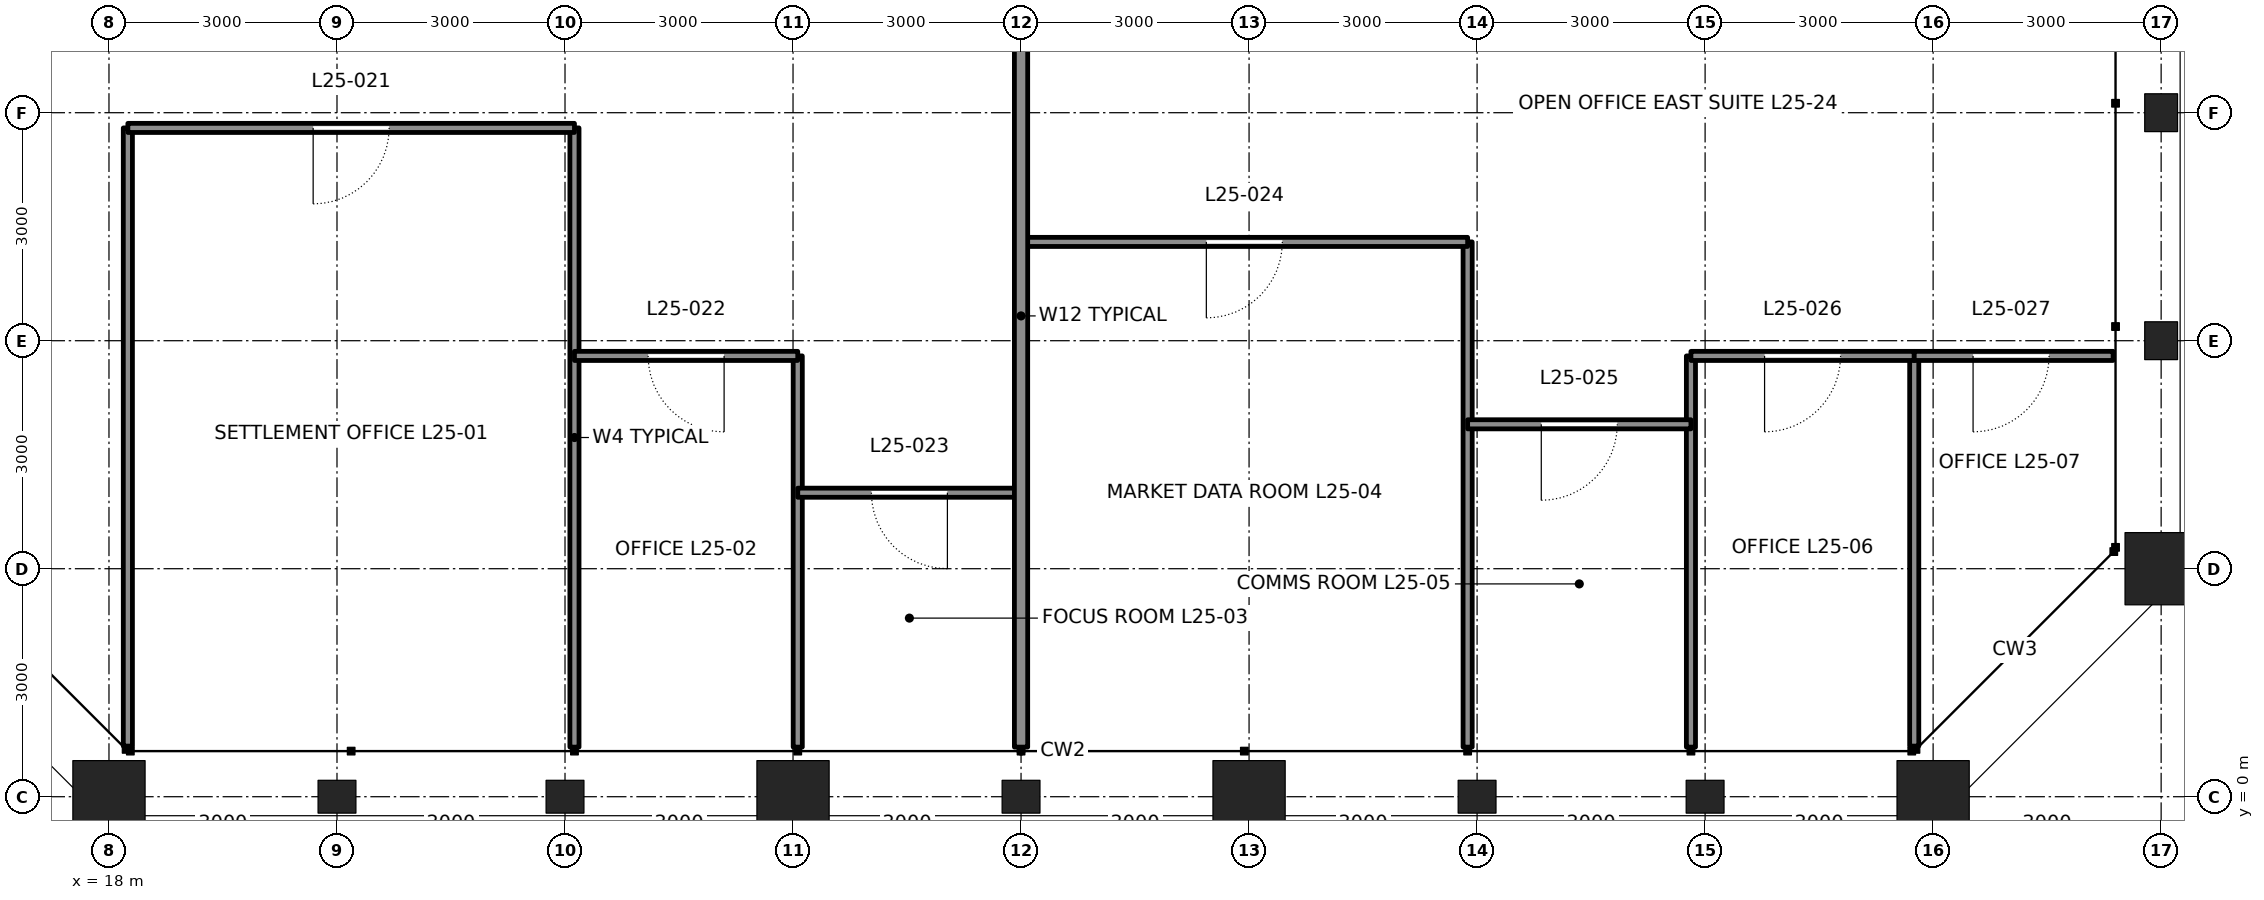
"""IFC4 building model, lengths in metres.
Left out: names, types, materials, properties, quantities, classifications, styles, units other than length and angle.
Written with IfcOpenShell. Run it as: python <this file> out.ifc"""

import sys

from ifc_helpers import new_model, si_unit, direction, frame, frame_2d, origin, origin_2d, place, context, subcontext, project, spatial, rectangle, hollow_rectangle, i_section, extrude, element, fill, save


model = new_model("IFC4")
c1 = context("Model", 3, precision=1e-05, world=origin(), true_north=direction((0.0, 1.0)))
c2 = subcontext(c1, "Body", "Model", "MODEL_VIEW")
j1 = project(units=[si_unit("LENGTHUNIT", "METRE"), si_unit("PLANEANGLEUNIT", "RADIAN")], contexts=[c1])
p1 = place(None, origin())
s1 = spatial("IfcSite", under=j1, at=p1, CompositionType="ELEMENT")
p2 = place(p1, origin())
s2 = spatial("IfcBuilding", under=s1, at=p2, CompositionType="ELEMENT")
p3 = place(p2, frame((0.0, 0.0, 119.4)))
s3 = spatial("IfcBuildingStorey", under=s2, at=p3, CompositionType="ELEMENT", Elevation=119.4)
p4 = place(p3, frame((18.0, 0.0, 0.0), z_axis=(0.0, 0.0, 1.0), x_axis=(0.0, -1.0, 0.0)))
e1 = element("IfcColumn", 1, at=p4, inside=s3, PredefinedType="COLUMN", context=c2, shape_type="SweptSolid", body=[
    extrude(hollow_rectangle(XDim=0.95, YDim=0.95, WallThickness=0.095, at=origin_2d()), origin(), (0.0, 0.0, 1.0), 4.2),
])
for number, where, z_axis, x_axis in (
    (2, (21.0, 0.0, 0.0), (0.0, 0.0, 1.0), (0.0, -1.0, 0.0)),
    (3, (24.0, 0.0, 0.0), (0.0, 0.0, 1.0), (0.0, -1.0, 0.0)),
):
    element("IfcColumn", number, at=place(p3, frame(where, z_axis=z_axis, x_axis=x_axis)), inside=s3, PredefinedType="COLUMN", context=c2, shape_type="SweptSolid", body=[
        extrude(i_section(OverallWidth=0.432, OverallDepth=0.498, WebThickness=0.056, FlangeThickness=0.089, at=origin_2d()), origin(), (0.0, 0.0, 1.0), 4.2),
    ])
p5 = place(p3, frame((27.0, 0.0, 0.0), z_axis=(0.0, 0.0, 1.0), x_axis=(0.0, -1.0, 0.0)))
e4 = element("IfcColumn", 4, at=p5, inside=s3, PredefinedType="COLUMN", context=c2, shape_type="SweptSolid", body=[
    extrude(hollow_rectangle(XDim=0.95, YDim=0.95, WallThickness=0.11, at=origin_2d()), origin(), (0.0, 0.0, 1.0), 4.2),
])
p6 = place(p3, frame((30.0, 0.0, 0.0), z_axis=(0.0, 0.0, 1.0), x_axis=(0.0, -1.0, 0.0)))
e5 = element("IfcColumn", 5, at=p6, inside=s3, PredefinedType="COLUMN", context=c2, shape_type="SweptSolid", body=[
    extrude(i_section(OverallWidth=0.432, OverallDepth=0.498, WebThickness=0.056, FlangeThickness=0.089, at=origin_2d()), origin(), (0.0, 0.0, 1.0), 4.2),
])
p7 = place(p3, frame((33.0, 0.0, 0.0), z_axis=(0.0, 0.0, 1.0), x_axis=(0.0, -1.0, 0.0)))
e6 = element("IfcColumn", 6, at=p7, inside=s3, PredefinedType="COLUMN", context=c2, shape_type="SweptSolid", body=[
    extrude(hollow_rectangle(XDim=0.95, YDim=0.95, WallThickness=0.11, at=origin_2d()), origin(), (0.0, 0.0, 1.0), 4.2),
])
for number, where, z_axis, x_axis in (
    (7, (36.0, 0.0, 0.0), (0.0, 0.0, 1.0), (0.0, -1.0, 0.0)),
    (8, (39.0, 0.0, 0.0), (0.0, 0.0, 1.0), (0.0, -1.0, 0.0)),
):
    element("IfcColumn", number, at=place(p3, frame(where, z_axis=z_axis, x_axis=x_axis)), inside=s3, PredefinedType="COLUMN", context=c2, shape_type="SweptSolid", body=[
        extrude(i_section(OverallWidth=0.432, OverallDepth=0.498, WebThickness=0.056, FlangeThickness=0.089, at=origin_2d()), origin(), (0.0, 0.0, 1.0), 4.2),
    ])
for number, where, z_axis, x_axis in (
    (9, (42.0, 0.0, 0.0), (0.0, 0.0, 1.0), (0.0, -1.0, 0.0)),
    (10, (45.0, 3.0, 0.0), (0.0, 0.0, 1.0), (1.0, 0.0, 0.0)),
):
    element("IfcColumn", number, at=place(p3, frame(where, z_axis=z_axis, x_axis=x_axis)), inside=s3, PredefinedType="COLUMN", context=c2, shape_type="SweptSolid", body=[
        extrude(hollow_rectangle(XDim=0.95, YDim=0.95, WallThickness=0.095, at=origin_2d()), origin(), (0.0, 0.0, 1.0), 4.2),
    ])
for number, where, z_axis, x_axis in (
    (11, (45.0, 6.0, 0.0), (0.0, 0.0, 1.0), (1.0, 0.0, 0.0)),
    (12, (45.0, 9.0, 0.0), (0.0, 0.0, 1.0), (1.0, 0.0, 0.0)),
):
    element("IfcColumn", number, at=place(p3, frame(where, z_axis=z_axis, x_axis=x_axis)), inside=s3, PredefinedType="COLUMN", context=c2, shape_type="SweptSolid", body=[
        extrude(i_section(OverallWidth=0.432, OverallDepth=0.498, WebThickness=0.056, FlangeThickness=0.089, at=origin_2d()), origin(), (0.0, 0.0, 1.0), 4.2),
    ])
p8 = place(p3, frame((18.249, 0.666, 0.0), z_axis=(0.0, 0.0, 1.0), x_axis=(0.0, 1.0, 0.0)))
e13 = element("IfcWall", 13, at=p8, inside=s3, PredefinedType="PARTITIONING", context=c2, shape_type="SweptSolid", body=[
    extrude(rectangle(XDim=8.134, YDim=0.12, at=frame_2d((4.067, 0.0))), origin(), (0.0, 0.0, 1.0), 4.04),
])
p9 = place(p3, frame((24.124, 0.653, 0.0), z_axis=(0.0, 0.0, 1.0), x_axis=(0.0, 1.0, 0.0)))
e14 = element("IfcWall", 14, at=p9, inside=s3, PredefinedType="PARTITIONING", context=c2, shape_type="SweptSolid", body=[
    extrude(rectangle(XDim=8.147, YDim=0.12, at=frame_2d((4.074, 0.0))), origin(), (0.0, 0.0, 1.0), 3.357),
])
p10 = place(p3, frame((27.062, 0.653, 0.0), z_axis=(0.0, 0.0, 1.0), x_axis=(0.0, 1.0, 0.0)))
e15 = element("IfcWall", 15, at=p10, inside=s3, PredefinedType="PARTITIONING", context=c2, shape_type="SweptSolid", body=[
    extrude(rectangle(XDim=5.147, YDim=0.12, at=frame_2d((2.574, 0.0))), origin(), (0.0, 0.0, 1.0), 3.357),
])
p11 = place(p3, frame((35.876, 0.653, 0.0), z_axis=(0.0, 0.0, 1.0), x_axis=(0.0, 1.0, 0.0)))
e16 = element("IfcWall", 16, at=p11, inside=s3, PredefinedType="PARTITIONING", context=c2, shape_type="SweptSolid", body=[
    extrude(rectangle(XDim=6.647, YDim=0.12, at=frame_2d((3.324, 0.0))), origin(), (0.0, 0.0, 1.0), 4.04),
])
p12 = place(p3, frame((38.814, 0.653, 0.0), z_axis=(0.0, 0.0, 1.0), x_axis=(0.0, 1.0, 0.0)))
e17 = element("IfcWall", 17, at=p12, inside=s3, PredefinedType="PARTITIONING", context=c2, shape_type="SweptSolid", body=[
    extrude(rectangle(XDim=5.147, YDim=0.12, at=frame_2d((2.574, 0.0))), origin(), (0.0, 0.0, 1.0), 4.04),
])
p13 = place(p3, frame((41.751, 0.666, 0.0), z_axis=(0.0, 0.0, 1.0), x_axis=(0.0, 1.0, 0.0)))
e18 = element("IfcWall", 18, at=p13, inside=s3, PredefinedType="PARTITIONING", context=c2, shape_type="SweptSolid", body=[
    extrude(rectangle(XDim=5.134, YDim=0.12, at=frame_2d((2.567, 0.0))), origin(), (0.0, 0.0, 1.0), 4.04),
])
p14 = place(p3, frame((18.249, 8.8, 0.0), z_axis=(0.0, 0.0, 1.0), x_axis=(1.0, 0.0, 0.0)))
e19 = element("IfcWall", 19, at=p14, inside=s3, PredefinedType="PARTITIONING", context=c2, shape_type="SweptSolid", body=[
    extrude(rectangle(XDim=5.876, YDim=0.12, at=frame_2d((2.938, 0.0))), origin(), (0.0, 0.0, 1.0), 4.04),
])
p15 = place(p14, frame((2.438, 0.0, 0.0)))
e20 = element("IfcOpeningElement", 20, at=p15, cuts=e19, PredefinedType="OPENING", context=c2, shape_type="SweptSolid", body=[
    extrude(rectangle(XDim=1.0, YDim=2.4, at=frame_2d((0.5, 1.2))), frame((0.0, 0.07, 0.0), z_axis=(0.0, -1.0, 0.0), x_axis=(1.0, 0.0, 0.0)), (0.0, 0.0, 1.0), 0.14),
])
p16 = place(p3, frame((24.124, 5.8, 0.0), z_axis=(0.0, 0.0, 1.0), x_axis=(1.0, 0.0, 0.0)))
e21 = element("IfcWall", 21, at=p16, inside=s3, PredefinedType="PARTITIONING", context=c2, shape_type="SweptSolid", body=[
    extrude(rectangle(XDim=2.938, YDim=0.12, at=frame_2d((1.469, 0.0))), origin(), (0.0, 0.0, 1.0), 4.04),
])
p17 = place(p16, frame((0.969, 0.0, 0.0)))
e22 = element("IfcOpeningElement", 22, at=p17, cuts=e21, PredefinedType="OPENING", context=c2, shape_type="SweptSolid", body=[
    extrude(rectangle(XDim=1.0, YDim=2.4, at=frame_2d((0.5, 1.2))), frame((0.0, 0.07, 0.0), z_axis=(0.0, -1.0, 0.0), x_axis=(1.0, 0.0, 0.0)), (0.0, 0.0, 1.0), 0.14),
])
p18 = place(p3, frame((27.062, 4.0, 0.0), z_axis=(0.0, 0.0, 1.0), x_axis=(1.0, 0.0, 0.0)))
e23 = element("IfcWall", 23, at=p18, inside=s3, PredefinedType="PARTITIONING", context=c2, shape_type="SweptSolid", body=[
    extrude(rectangle(XDim=2.938, YDim=0.12, at=frame_2d((1.469, 0.0))), origin(), (0.0, 0.0, 1.0), 4.04),
])
p19 = place(p18, frame((0.969, 0.0, 0.0)))
e24 = element("IfcOpeningElement", 24, at=p19, cuts=e23, PredefinedType="OPENING", context=c2, shape_type="SweptSolid", body=[
    extrude(rectangle(XDim=1.0, YDim=2.4, at=frame_2d((0.5, 1.2))), frame((0.0, 0.07, 0.0), z_axis=(0.0, -1.0, 0.0), x_axis=(1.0, 0.0, 0.0)), (0.0, 0.0, 1.0), 0.14),
])
p20 = place(p3, frame((30.0, 7.3, 0.0), z_axis=(0.0, 0.0, 1.0), x_axis=(1.0, 0.0, 0.0)))
e25 = element("IfcWall", 25, at=p20, inside=s3, PredefinedType="PARTITIONING", context=c2, shape_type="SweptSolid", body=[
    extrude(rectangle(XDim=5.876, YDim=0.12, at=frame_2d((2.938, 0.0))), origin(), (0.0, 0.0, 1.0), 4.04),
])
p21 = place(p20, frame((2.438, 0.0, 0.0)))
e26 = element("IfcOpeningElement", 26, at=p21, cuts=e25, PredefinedType="OPENING", context=c2, shape_type="SweptSolid", body=[
    extrude(rectangle(XDim=1.0, YDim=2.4, at=frame_2d((0.5, 1.2))), frame((0.0, 0.07, 0.0), z_axis=(0.0, -1.0, 0.0), x_axis=(1.0, 0.0, 0.0)), (0.0, 0.0, 1.0), 0.14),
])
p22 = place(p3, frame((35.876, 4.9, 0.0), z_axis=(0.0, 0.0, 1.0), x_axis=(1.0, 0.0, 0.0)))
e27 = element("IfcWall", 27, at=p22, inside=s3, PredefinedType="PARTITIONING", context=c2, shape_type="SweptSolid", body=[
    extrude(rectangle(XDim=2.938, YDim=0.12, at=frame_2d((1.469, 0.0))), origin(), (0.0, 0.0, 1.0), 4.04),
])
p23 = place(p22, frame((0.969, 0.0, 0.0)))
e28 = element("IfcOpeningElement", 28, at=p23, cuts=e27, PredefinedType="OPENING", context=c2, shape_type="SweptSolid", body=[
    extrude(rectangle(XDim=1.0, YDim=2.4, at=frame_2d((0.5, 1.2))), frame((0.0, 0.07, 0.0), z_axis=(0.0, -1.0, 0.0), x_axis=(1.0, 0.0, 0.0)), (0.0, 0.0, 1.0), 0.14),
])
p24 = place(p3, frame((38.814, 5.8, 0.0), z_axis=(0.0, 0.0, 1.0), x_axis=(1.0, 0.0, 0.0)))
e29 = element("IfcWall", 29, at=p24, inside=s3, PredefinedType="PARTITIONING", context=c2, shape_type="SweptSolid", body=[
    extrude(rectangle(XDim=2.938, YDim=0.12, at=frame_2d((1.469, 0.0))), origin(), (0.0, 0.0, 1.0), 4.04),
])
p25 = place(p24, frame((0.969, 0.0, 0.0)))
e30 = element("IfcOpeningElement", 30, at=p25, cuts=e29, PredefinedType="OPENING", context=c2, shape_type="SweptSolid", body=[
    extrude(rectangle(XDim=1.0, YDim=2.4, at=frame_2d((0.5, 1.2))), frame((0.0, 0.07, 0.0), z_axis=(0.0, -1.0, 0.0), x_axis=(1.0, 0.0, 0.0)), (0.0, 0.0, 1.0), 0.14),
])
p26 = place(p3, frame((41.751, 5.8, 0.0), z_axis=(0.0, 0.0, 1.0), x_axis=(1.0, 0.0, 0.0)))
e31 = element("IfcWall", 31, at=p26, inside=s3, PredefinedType="PARTITIONING", context=c2, shape_type="SweptSolid", body=[
    extrude(rectangle(XDim=2.616, YDim=0.12, at=frame_2d((1.308, 0.0))), origin(), (0.0, 0.0, 1.0), 4.04),
])
p27 = place(p26, frame((0.774, 0.0, 0.0)))
e32 = element("IfcOpeningElement", 32, at=p27, cuts=e31, PredefinedType="OPENING", context=c2, shape_type="SweptSolid", body=[
    extrude(rectangle(XDim=1.0, YDim=2.4, at=frame_2d((0.5, 1.2))), frame((0.0, 0.07, 0.0), z_axis=(0.0, -1.0, 0.0), x_axis=(1.0, 0.0, 0.0)), (0.0, 0.0, 1.0), 0.14),
])
p28 = place(p3, frame((30.0, 0.653, 0.0), z_axis=(0.0, 0.0, 1.0), x_axis=(0.0, 1.0, 0.0)))
e33 = element("IfcWall", 33, at=p28, inside=s3, PredefinedType="PARTITIONING", context=c2, shape_type="SweptSolid", body=[
    extrude(rectangle(XDim=11.347, YDim=0.175, at=frame_2d((5.674, 0.0))), origin(), (0.0, 0.0, 1.0), 3.357),
])
p29 = place(p15, frame((1.0, 0.0, 0.0), z_axis=(0.0, 0.0, 1.0), x_axis=(-1.0, 0.0, 0.0)))
e34 = element("IfcDoor", 34, at=p29, inside=s3, OperationType="SINGLE_SWING_RIGHT", PredefinedType="DOOR", context=c2, shape_type="SweptSolid", body=[
    extrude(rectangle(XDim=1.0, YDim=2.4, at=frame_2d((0.5, 1.2))), frame((0.0, 0.025, 0.0), z_axis=(0.0, -1.0, 0.0), x_axis=(1.0, 0.0, 0.0)), (0.0, 0.0, 1.0), 0.05),
])
fill(e20, e34)
p30 = place(p17, frame((1.0, 0.0, 0.0), z_axis=(0.0, 0.0, 1.0), x_axis=(-1.0, 0.0, 0.0)))
e35 = element("IfcDoor", 35, at=p30, inside=s3, OperationType="SINGLE_SWING_LEFT", PredefinedType="DOOR", context=c2, shape_type="SweptSolid", body=[
    extrude(rectangle(XDim=1.0, YDim=2.4, at=frame_2d((0.5, 1.2))), frame((0.0, 0.025, 0.0), z_axis=(0.0, -1.0, 0.0), x_axis=(1.0, 0.0, 0.0)), (0.0, 0.0, 1.0), 0.05),
])
fill(e22, e35)
p31 = place(p19, frame((1.0, 0.0, 0.0), z_axis=(0.0, 0.0, 1.0), x_axis=(-1.0, 0.0, 0.0)))
e36 = element("IfcDoor", 36, at=p31, inside=s3, OperationType="SINGLE_SWING_LEFT", PredefinedType="DOOR", context=c2, shape_type="SweptSolid", body=[
    extrude(rectangle(XDim=1.0, YDim=2.4, at=frame_2d((0.5, 1.2))), frame((0.0, 0.025, 0.0), z_axis=(0.0, -1.0, 0.0), x_axis=(1.0, 0.0, 0.0)), (0.0, 0.0, 1.0), 0.05),
])
fill(e24, e36)
p32 = place(p21, frame((1.0, 0.0, 0.0), z_axis=(0.0, 0.0, 1.0), x_axis=(-1.0, 0.0, 0.0)))
e37 = element("IfcDoor", 37, at=p32, inside=s3, OperationType="SINGLE_SWING_RIGHT", PredefinedType="DOOR", context=c2, shape_type="SweptSolid", body=[
    extrude(rectangle(XDim=1.0, YDim=2.4, at=frame_2d((0.5, 1.2))), frame((0.0, 0.025, 0.0), z_axis=(0.0, -1.0, 0.0), x_axis=(1.0, 0.0, 0.0)), (0.0, 0.0, 1.0), 0.05),
])
fill(e26, e37)
p33 = place(p23, frame((1.0, 0.0, 0.0), z_axis=(0.0, 0.0, 1.0), x_axis=(-1.0, 0.0, 0.0)))
e38 = element("IfcDoor", 38, at=p33, inside=s3, OperationType="SINGLE_SWING_RIGHT", PredefinedType="DOOR", context=c2, shape_type="SweptSolid", body=[
    extrude(rectangle(XDim=1.0, YDim=2.4, at=frame_2d((0.5, 1.2))), frame((0.0, 0.025, 0.0), z_axis=(0.0, -1.0, 0.0), x_axis=(1.0, 0.0, 0.0)), (0.0, 0.0, 1.0), 0.05),
])
fill(e28, e38)
p34 = place(p25, frame((1.0, 0.0, 0.0), z_axis=(0.0, 0.0, 1.0), x_axis=(-1.0, 0.0, 0.0)))
e39 = element("IfcDoor", 39, at=p34, inside=s3, OperationType="SINGLE_SWING_RIGHT", PredefinedType="DOOR", context=c2, shape_type="SweptSolid", body=[
    extrude(rectangle(XDim=1.0, YDim=2.4, at=frame_2d((0.5, 1.2))), frame((0.0, 0.025, 0.0), z_axis=(0.0, -1.0, 0.0), x_axis=(1.0, 0.0, 0.0)), (0.0, 0.0, 1.0), 0.05),
])
fill(e30, e39)
p35 = place(p27, frame((1.0, 0.0, 0.0), z_axis=(0.0, 0.0, 1.0), x_axis=(-1.0, 0.0, 0.0)))
e40 = element("IfcDoor", 40, at=p35, inside=s3, OperationType="SINGLE_SWING_RIGHT", PredefinedType="DOOR", context=c2, shape_type="SweptSolid", body=[
    extrude(rectangle(XDim=1.0, YDim=2.4, at=frame_2d((0.5, 1.2))), frame((0.0, 0.025, 0.0), z_axis=(0.0, -1.0, 0.0), x_axis=(1.0, 0.0, 0.0)), (0.0, 0.0, 1.0), 0.05),
])
fill(e32, e40)
save(model, sys.argv[1])
